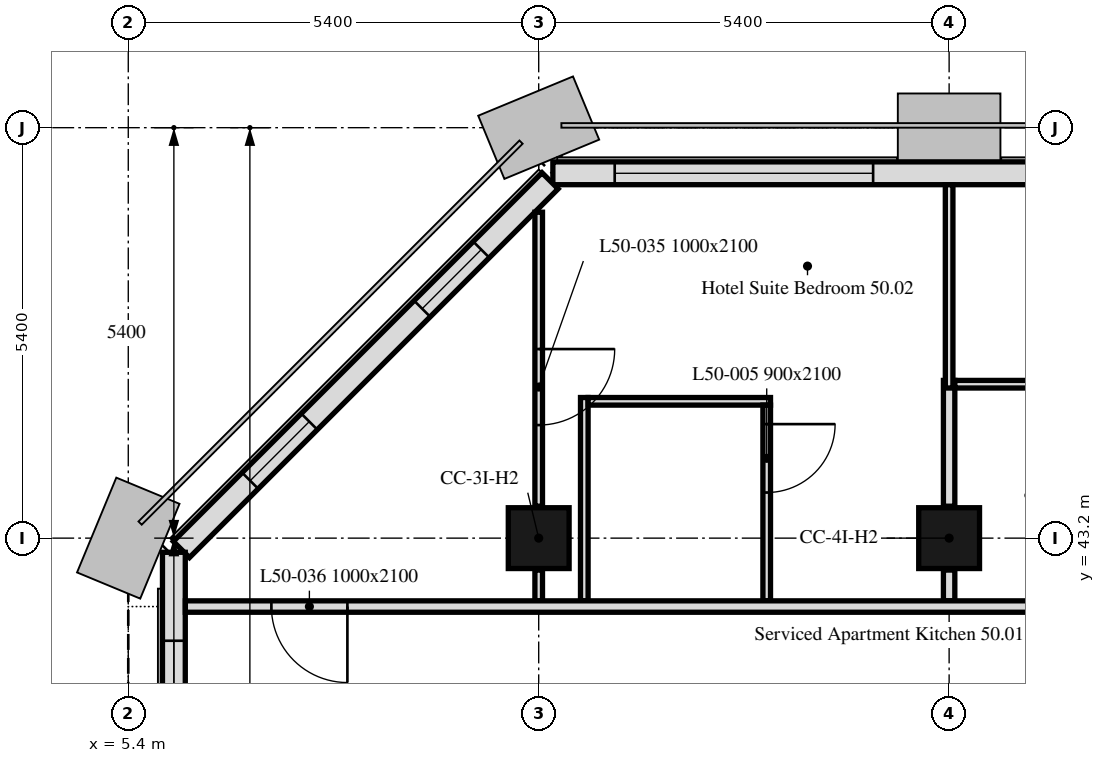
"""IFC4 building model, lengths in metres.
Left out: names, types, materials, properties, quantities, classifications, styles, units other than length and angle.
Written with IfcOpenShell. Run it as: python <this file> out.ifc"""

import sys

from ifc_helpers import new_model, si_unit, direction, frame, frame_2d, origin, origin_2d, place, context, subcontext, project, spatial, rectangle, extrude, element, fill, save


model = new_model("IFC4")
c1 = context("Model", 3, precision=1e-05, world=origin(), true_north=direction((0.0, 1.0)))
c2 = subcontext(c1, "Body", "Model", "MODEL_VIEW")
j1 = project(units=[si_unit("LENGTHUNIT", "METRE"), si_unit("PLANEANGLEUNIT", "RADIAN")], contexts=[c1])
p1 = place(None, origin())
s1 = spatial("IfcSite", under=j1, at=p1, CompositionType="ELEMENT")
p2 = place(p1, origin())
s2 = spatial("IfcBuilding", under=s1, at=p2, CompositionType="ELEMENT")
p3 = place(p2, frame((0.0, 0.0, 203.8)))
s3 = spatial("IfcBuildingStorey", under=s2, at=p3, CompositionType="ELEMENT", Elevation=203.8)
for number, where, z_axis, x_axis in (
    (1, (10.8, 43.2, 0.0), (0.0, 0.0, 1.0), (1.0, 0.0, 0.0)),
    (2, (16.2, 43.2, 0.0), (0.0, 0.0, 1.0), (1.0, 0.0, 0.0)),
):
    element("IfcColumn", number, at=place(p3, frame(where, z_axis=z_axis, x_axis=x_axis)), inside=s3, PredefinedType="COLUMN", context=c2, shape_type="SweptSolid", body=[
        extrude(rectangle(XDim=0.8, YDim=0.8, at=origin_2d()), origin(), (0.0, 0.0, 1.0), 3.0),
    ])
p4 = place(p3, frame((43.014, 48.0, 0.0), z_axis=(0.0, 0.0, 1.0), x_axis=(-1.0, 0.0, 0.0)))
e3 = element("IfcWall", 3, at=p4, inside=s3, PredefinedType="SOLIDWALL", context=c2, shape_type="SweptSolid", body=[
    extrude(rectangle(XDim=32.027, YDim=0.3, at=frame_2d((16.014, 0.0))), origin(), (0.0, 0.0, 1.0), 3.0),
])
p5 = place(p4, frame((2.764, 0.0, 0.9)))
e4 = element("IfcOpeningElement", 4, at=p5, cuts=e3, PredefinedType="OPENING", context=c2, shape_type="SweptSolid", body=[
    extrude(rectangle(XDim=1.1, YDim=1.7, at=frame_2d((0.55, 0.85))), frame((0.0, 0.16, 0.0), z_axis=(0.0, -1.0, 0.0), x_axis=(1.0, 0.0, 0.0)), (0.0, 0.0, 1.0), 0.32),
])
p6 = place(p4, frame((6.214, 0.0, 0.9)))
e5 = element("IfcOpeningElement", 5, at=p6, cuts=e3, PredefinedType="OPENING", context=c2, shape_type="SweptSolid", body=[
    extrude(rectangle(XDim=3.4, YDim=1.7, at=frame_2d((1.7, 0.85))), frame((0.0, 0.16, 0.0), z_axis=(0.0, -1.0, 0.0), x_axis=(1.0, 0.0, 0.0)), (0.0, 0.0, 1.0), 0.32),
])
p7 = place(p4, frame((12.664, 0.0, 0.9)))
e6 = element("IfcOpeningElement", 6, at=p7, cuts=e3, PredefinedType="OPENING", context=c2, shape_type="SweptSolid", body=[
    extrude(rectangle(XDim=1.1, YDim=1.7, at=frame_2d((0.55, 0.85))), frame((0.0, 0.16, 0.0), z_axis=(0.0, -1.0, 0.0), x_axis=(1.0, 0.0, 0.0)), (0.0, 0.0, 1.0), 0.32),
])
p8 = place(p4, frame((17.014, 0.0, 0.9)))
e7 = element("IfcOpeningElement", 7, at=p8, cuts=e3, PredefinedType="OPENING", context=c2, shape_type="SweptSolid", body=[
    extrude(rectangle(XDim=3.4, YDim=1.7, at=frame_2d((1.7, 0.85))), frame((0.0, 0.16, 0.0), z_axis=(0.0, -1.0, 0.0), x_axis=(1.0, 0.0, 0.0)), (0.0, 0.0, 1.0), 0.32),
])
p9 = place(p4, frame((23.464, 0.0, 0.9)))
e8 = element("IfcOpeningElement", 8, at=p9, cuts=e3, PredefinedType="OPENING", context=c2, shape_type="SweptSolid", body=[
    extrude(rectangle(XDim=1.1, YDim=1.7, at=frame_2d((0.55, 0.85))), frame((0.0, 0.16, 0.0), z_axis=(0.0, -1.0, 0.0), x_axis=(1.0, 0.0, 0.0)), (0.0, 0.0, 1.0), 0.32),
])
p10 = place(p4, frame((27.814, 0.0, 0.9)))
e9 = element("IfcOpeningElement", 9, at=p10, cuts=e3, PredefinedType="OPENING", context=c2, shape_type="SweptSolid", body=[
    extrude(rectangle(XDim=3.4, YDim=1.7, at=frame_2d((1.7, 0.85))), frame((0.0, 0.16, 0.0), z_axis=(0.0, -1.0, 0.0), x_axis=(1.0, 0.0, 0.0)), (0.0, 0.0, 1.0), 0.32),
])
p11 = place(p3, frame((10.949, 47.901, 0.0), z_axis=(0.0, 0.0, 1.0), x_axis=(-0.707106781187, -0.707106781187, 0.0)))
e10 = element("IfcWall", 10, at=p11, inside=s3, PredefinedType="SOLIDWALL", context=c2, shape_type="SweptSolid", body=[
    extrude(rectangle(XDim=6.86, YDim=0.3, at=frame_2d((3.43, 0.0))), origin(), (0.0, 0.0, 1.0), 3.0),
])
p12 = place(p11, frame((1.28, 0.0, 0.9)))
e11 = element("IfcOpeningElement", 11, at=p12, cuts=e10, PredefinedType="OPENING", context=c2, shape_type="SweptSolid", body=[
    extrude(rectangle(XDim=1.1, YDim=1.7, at=frame_2d((0.55, 0.85))), frame((0.0, 0.16, 0.0), z_axis=(0.0, -1.0, 0.0), x_axis=(1.0, 0.0, 0.0)), (0.0, 0.0, 1.0), 0.32),
])
p13 = place(p11, frame((4.48, 0.0, 0.9)))
e12 = element("IfcOpeningElement", 12, at=p13, cuts=e10, PredefinedType="OPENING", context=c2, shape_type="SweptSolid", body=[
    extrude(rectangle(XDim=1.1, YDim=1.7, at=frame_2d((0.55, 0.85))), frame((0.0, 0.16, 0.0), z_axis=(0.0, -1.0, 0.0), x_axis=(1.0, 0.0, 0.0)), (0.0, 0.0, 1.0), 0.32),
])
p14 = place(p3, frame((6.0, 43.014, 0.0), z_axis=(0.0, 0.0, 1.0), x_axis=(0.0, -1.0, 0.0)))
e13 = element("IfcWall", 13, at=p14, inside=s3, PredefinedType="SOLIDWALL", context=c2, shape_type="SweptSolid", body=[
    extrude(rectangle(XDim=10.614, YDim=0.3, at=frame_2d((5.307, 0.0))), origin(), (0.0, 0.0, 1.0), 3.0),
])
p15 = place(p14, frame((1.164, 0.0, 0.9)))
e14 = element("IfcOpeningElement", 14, at=p15, cuts=e13, PredefinedType="OPENING", context=c2, shape_type="SweptSolid", body=[
    extrude(rectangle(XDim=1.1, YDim=1.7, at=frame_2d((0.55, 0.85))), frame((0.0, 0.16, 0.0), z_axis=(0.0, -1.0, 0.0), x_axis=(1.0, 0.0, 0.0)), (0.0, 0.0, 1.0), 0.32),
])
p16 = place(p14, frame((2.764, 0.0, 0.9)))
e15 = element("IfcOpeningElement", 15, at=p16, cuts=e13, PredefinedType="OPENING", context=c2, shape_type="SweptSolid", body=[
    extrude(rectangle(XDim=1.1, YDim=1.7, at=frame_2d((0.55, 0.85))), frame((0.0, 0.16, 0.0), z_axis=(0.0, -1.0, 0.0), x_axis=(1.0, 0.0, 0.0)), (0.0, 0.0, 1.0), 0.32),
])
p17 = place(p14, frame((6.214, 0.0, 0.9)))
e16 = element("IfcOpeningElement", 16, at=p17, cuts=e13, PredefinedType="OPENING", context=c2, shape_type="SweptSolid", body=[
    extrude(rectangle(XDim=3.4, YDim=1.7, at=frame_2d((1.7, 0.85))), frame((0.0, 0.16, 0.0), z_axis=(0.0, -1.0, 0.0), x_axis=(1.0, 0.0, 0.0)), (0.0, 0.0, 1.0), 0.32),
])
p18 = place(p3, frame((10.8, 47.488, 0.0), z_axis=(0.0, 0.0, 1.0), x_axis=(0.0, -1.0, 0.0)))
e17 = element("IfcWall", 17, at=p18, inside=s3, PredefinedType="PARTITIONING", context=c2, shape_type="SweptSolid", body=[
    extrude(rectangle(XDim=3.868, YDim=0.1, at=frame_2d((1.934, 0.0))), origin(), (0.0, 0.0, 1.0), 2.4),
])
p19 = place(p18, frame((1.8, 0.0, 0.0)))
e18 = element("IfcOpeningElement", 18, at=p19, cuts=e17, PredefinedType="OPENING", context=c2, shape_type="SweptSolid", body=[
    extrude(rectangle(XDim=1.0, YDim=2.1, at=frame_2d((0.5, 1.05))), frame((0.0, 0.05, 0.0), z_axis=(0.0, -1.0, 0.0), x_axis=(1.0, 0.0, 0.0)), (0.0, 0.0, 1.0), 0.1),
])
p20 = place(p3, frame((10.8, 42.78, 0.0), z_axis=(0.0, 0.0, 1.0), x_axis=(0.0, -1.0, 0.0)))
e19 = element("IfcWall", 19, at=p20, inside=s3, PredefinedType="PARTITIONING", context=c2, shape_type="SweptSolid", body=[
    extrude(rectangle(XDim=0.405, YDim=0.1, at=frame_2d((0.203, 0.0))), origin(), (0.0, 0.0, 1.0), 2.4),
])
p21 = place(p3, frame((11.4, 42.375, 0.0), z_axis=(0.0, 0.0, 1.0), x_axis=(0.0, 1.0, 0.0)))
e20 = element("IfcWall", 20, at=p21, inside=s3, PredefinedType="PARTITIONING", context=c2, shape_type="SweptSolid", body=[
    extrude(rectangle(XDim=2.675, YDim=0.1, at=frame_2d((1.337, 0.0))), origin(), (0.0, 0.0, 1.0), 3.0),
])
p22 = place(p3, frame((11.45, 45.0, 0.0), z_axis=(0.0, 0.0, 1.0), x_axis=(1.0, 0.0, 0.0)))
e21 = element("IfcWall", 21, at=p22, inside=s3, PredefinedType="PARTITIONING", context=c2, shape_type="SweptSolid", body=[
    extrude(rectangle(XDim=2.4, YDim=0.1, at=frame_2d((1.2, 0.0))), origin(), (0.0, 0.0, 1.0), 3.0),
])
p23 = place(p3, frame((13.8, 44.95, 0.0), z_axis=(0.0, 0.0, 1.0), x_axis=(0.0, -1.0, 0.0)))
e22 = element("IfcWall", 22, at=p23, inside=s3, PredefinedType="PARTITIONING", context=c2, shape_type="SweptSolid", body=[
    extrude(rectangle(XDim=2.575, YDim=0.1, at=frame_2d((1.288, 0.0))), origin(), (0.0, 0.0, 1.0), 3.0),
])
p24 = place(p23, frame((0.25, 0.0, 0.0)))
e23 = element("IfcOpeningElement", 23, at=p24, cuts=e22, PredefinedType="OPENING", context=c2, shape_type="SweptSolid", body=[
    extrude(rectangle(XDim=0.9, YDim=2.1, at=frame_2d((0.45, 1.05))), frame((0.0, 0.05, 0.0), z_axis=(0.0, -1.0, 0.0), x_axis=(1.0, 0.0, 0.0)), (0.0, 0.0, 1.0), 0.1),
])
p25 = place(p3, frame((16.2, 42.375, 0.0), z_axis=(0.0, 0.0, 1.0), x_axis=(0.0, 1.0, 0.0)))
e24 = element("IfcWall", 24, at=p25, inside=s3, PredefinedType="PARTITIONING", context=c2, shape_type="SweptSolid", body=[
    extrude(rectangle(XDim=0.405, YDim=0.15, at=frame_2d((0.203, 0.0))), origin(), (0.0, 0.0, 1.0), 2.4),
])
p26 = place(p3, frame((16.2, 43.62, 0.0), z_axis=(0.0, 0.0, 1.0), x_axis=(0.0, 1.0, 0.0)))
e25 = element("IfcWall", 25, at=p26, inside=s3, PredefinedType="PARTITIONING", context=c2, shape_type="SweptSolid", body=[
    extrude(rectangle(XDim=1.655, YDim=0.15, at=frame_2d((0.827, 0.0))), origin(), (0.0, 0.0, 1.0), 2.4),
])
p27 = place(p3, frame((16.2, 45.175, 0.0), z_axis=(0.0, 0.0, 1.0), x_axis=(0.0, 1.0, 0.0)))
e26 = element("IfcWall", 26, at=p27, inside=s3, PredefinedType="PARTITIONING", context=c2, shape_type="SweptSolid", body=[
    extrude(rectangle(XDim=2.674, YDim=0.1, at=frame_2d((1.337, 0.0))), origin(), (0.0, 0.0, 1.0), 2.4),
])
p28 = place(p3, frame((18.25, 45.225, 0.0), z_axis=(0.0, 0.0, 1.0), x_axis=(-1.0, 0.0, 0.0)))
e27 = element("IfcWall", 27, at=p28, inside=s3, PredefinedType="PARTITIONING", context=c2, shape_type="SweptSolid", body=[
    extrude(rectangle(XDim=1.975, YDim=0.1, at=frame_2d((0.988, 0.0))), origin(), (0.0, 0.0, 1.0), 3.0),
])
p29 = place(p3, frame((47.849, 42.3, 0.0), z_axis=(0.0, 0.0, 1.0), x_axis=(-1.0, 0.0, 0.0)))
e28 = element("IfcWall", 28, at=p29, inside=s3, PredefinedType="PARTITIONING", context=c2, shape_type="SweptSolid", body=[
    extrude(rectangle(XDim=41.698, YDim=0.15, at=frame_2d((20.849, 0.0))), origin(), (0.0, 0.0, 1.0), 2.4),
])
p30 = place(p29, frame((39.566, 0.0, 0.0)))
e29 = element("IfcOpeningElement", 29, at=p30, cuts=e28, PredefinedType="OPENING", context=c2, shape_type="SweptSolid", body=[
    extrude(rectangle(XDim=1.0, YDim=2.1, at=frame_2d((0.5, 1.05))), frame((0.0, 0.075, 0.0), z_axis=(0.0, -1.0, 0.0), x_axis=(1.0, 0.0, 0.0)), (0.0, 0.0, 1.0), 0.15),
])
p31 = place(p29, frame((3.099, 0.0, 0.0)))
e30 = element("IfcOpeningElement", 30, at=p31, cuts=e28, PredefinedType="OPENING", context=c2, shape_type="SweptSolid", body=[
    extrude(rectangle(XDim=1.0, YDim=2.1, at=frame_2d((0.5, 1.05))), frame((0.0, 0.075, 0.0), z_axis=(0.0, -1.0, 0.0), x_axis=(1.0, 0.0, 0.0)), (0.0, 0.0, 1.0), 0.15),
])
p32 = place(p29, frame((28.249, 0.0, 0.0)))
e31 = element("IfcOpeningElement", 31, at=p32, cuts=e28, PredefinedType="OPENING", context=c2, shape_type="SweptSolid", body=[
    extrude(rectangle(XDim=1.0, YDim=2.1, at=frame_2d((0.5, 1.05))), frame((0.0, 0.075, 0.0), z_axis=(0.0, -1.0, 0.0), x_axis=(1.0, 0.0, 0.0)), (0.0, 0.0, 1.0), 0.15),
])
p33 = place(p29, frame((17.449, 0.0, 0.0)))
e32 = element("IfcOpeningElement", 32, at=p33, cuts=e28, PredefinedType="OPENING", context=c2, shape_type="SweptSolid", body=[
    extrude(rectangle(XDim=1.0, YDim=2.1, at=frame_2d((0.5, 1.05))), frame((0.0, 0.075, 0.0), z_axis=(0.0, -1.0, 0.0), x_axis=(1.0, 0.0, 0.0)), (0.0, 0.0, 1.0), 0.15),
])
p34 = place(p10, origin())
e33 = element("IfcWindow", 33, at=p34, inside=s3, PartitioningType="SINGLE_PANEL", PredefinedType="WINDOW", context=c2, shape_type="SweptSolid", body=[
    extrude(rectangle(XDim=3.4, YDim=1.7, at=frame_2d((1.7, 0.85))), frame((0.0, 0.03, 0.0), z_axis=(0.0, -1.0, 0.0), x_axis=(1.0, 0.0, 0.0)), (0.0, 0.0, 1.0), 0.06),
])
fill(e9, e33)
p35 = place(p12, origin())
e34 = element("IfcWindow", 34, at=p35, inside=s3, PartitioningType="SINGLE_PANEL", PredefinedType="WINDOW", context=c2, shape_type="SweptSolid", body=[
    extrude(rectangle(XDim=1.1, YDim=1.7, at=frame_2d((0.55, 0.85))), frame((0.0, 0.03, 0.0), z_axis=(0.0, -1.0, 0.0), x_axis=(1.0, 0.0, 0.0)), (0.0, 0.0, 1.0), 0.06),
])
fill(e11, e34)
p36 = place(p13, origin())
e35 = element("IfcWindow", 35, at=p36, inside=s3, PartitioningType="SINGLE_PANEL", PredefinedType="WINDOW", context=c2, shape_type="SweptSolid", body=[
    extrude(rectangle(XDim=1.1, YDim=1.7, at=frame_2d((0.55, 0.85))), frame((0.0, 0.03, 0.0), z_axis=(0.0, -1.0, 0.0), x_axis=(1.0, 0.0, 0.0)), (0.0, 0.0, 1.0), 0.06),
])
fill(e12, e35)
p37 = place(p15, origin())
e36 = element("IfcWindow", 36, at=p37, inside=s3, PartitioningType="SINGLE_PANEL", PredefinedType="WINDOW", context=c2, shape_type="SweptSolid", body=[
    extrude(rectangle(XDim=1.1, YDim=1.7, at=frame_2d((0.55, 0.85))), frame((0.0, 0.03, 0.0), z_axis=(0.0, -1.0, 0.0), x_axis=(1.0, 0.0, 0.0)), (0.0, 0.0, 1.0), 0.06),
])
fill(e14, e36)
p38 = place(p24, origin())
e37 = element("IfcDoor", 37, at=p38, inside=s3, OperationType="SINGLE_SWING_LEFT", PredefinedType="DOOR", context=c2, shape_type="SweptSolid", body=[
    extrude(rectangle(XDim=0.9, YDim=2.1, at=frame_2d((0.45, 1.05))), frame((0.0, 0.025, 0.0), z_axis=(0.0, -1.0, 0.0), x_axis=(1.0, 0.0, 0.0)), (0.0, 0.0, 1.0), 0.05),
])
fill(e23, e37)
p39 = place(p19, origin())
e38 = element("IfcDoor", 38, at=p39, inside=s3, OperationType="SINGLE_SWING_LEFT", PredefinedType="DOOR", context=c2, shape_type="SweptSolid", body=[
    extrude(rectangle(XDim=1.0, YDim=2.1, at=frame_2d((0.5, 1.05))), frame((0.0, 0.025, 0.0), z_axis=(0.0, -1.0, 0.0), x_axis=(1.0, 0.0, 0.0)), (0.0, 0.0, 1.0), 0.05),
])
fill(e18, e38)
p40 = place(p30, origin())
e39 = element("IfcDoor", 39, at=p40, inside=s3, OperationType="SINGLE_SWING_RIGHT", PredefinedType="DOOR", context=c2, shape_type="SweptSolid", body=[
    extrude(rectangle(XDim=1.0, YDim=2.1, at=frame_2d((0.5, 1.05))), frame((0.0, 0.025, 0.0), z_axis=(0.0, -1.0, 0.0), x_axis=(1.0, 0.0, 0.0)), (0.0, 0.0, 1.0), 0.05),
])
fill(e29, e39)
save(model, sys.argv[1])
